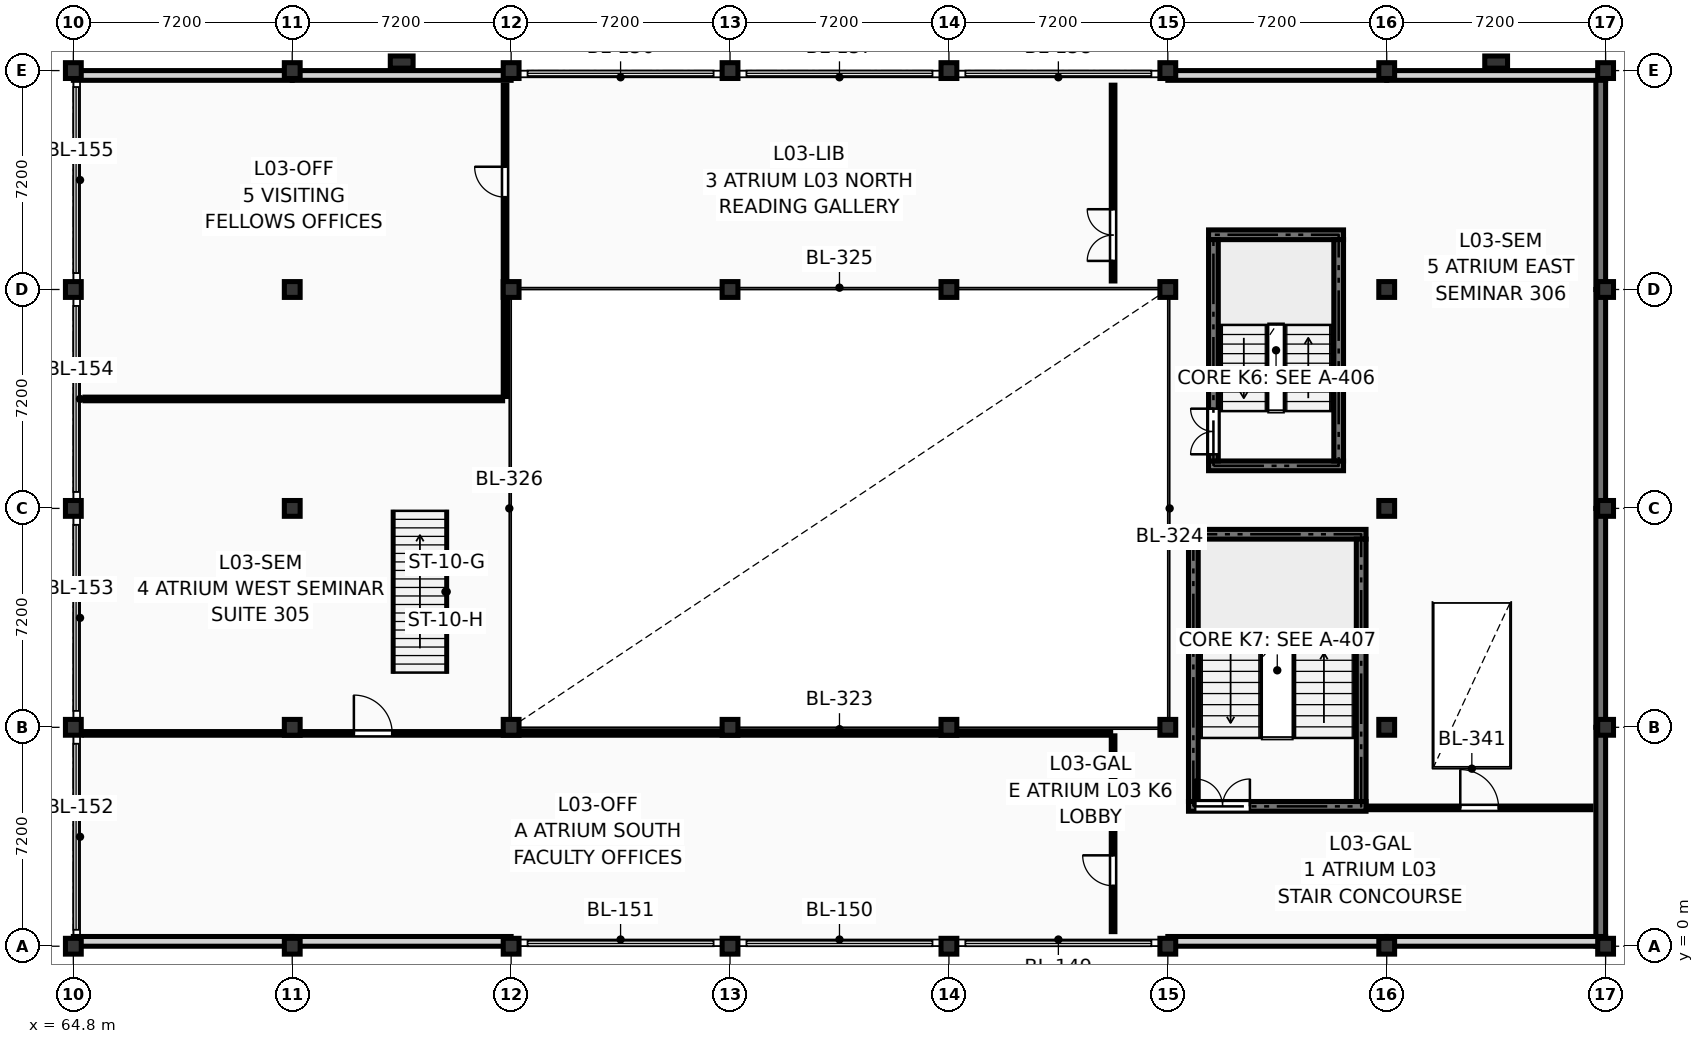
"""IFC4 building model, lengths in metres.
Left out: names, types, materials, properties, quantities, classifications, styles, units other than length and angle.
Written with IfcOpenShell. Run it as: python <this file> out.ifc"""

import sys

from ifc_helpers import new_model, si_unit, direction, frame, frame_2d, origin, origin_2d, place, context, subcontext, project, spatial, rectangle, extrude, element, fill, save


model = new_model("IFC4")
c1 = context("Model", 3, precision=1e-05, world=origin(), true_north=direction((0.0, 1.0)))
c2 = subcontext(c1, "Body", "Model", "MODEL_VIEW")
j1 = project(units=[si_unit("LENGTHUNIT", "METRE"), si_unit("PLANEANGLEUNIT", "RADIAN")], contexts=[c1])
p1 = place(None, origin())
s1 = spatial("IfcSite", under=j1, at=p1, CompositionType="ELEMENT")
p2 = place(p1, origin())
s2 = spatial("IfcBuilding", under=s1, at=p2, CompositionType="ELEMENT")
p3 = place(p2, frame((0.0, 0.0, 12.15)))
s3 = spatial("IfcBuildingStorey", under=s2, at=p3, CompositionType="ELEMENT", Elevation=12.15)
for number, where, z_axis, x_axis in (
    (1, (64.8, 0.0, 0.0), (0.0, 0.0, 1.0), (1.0, 0.0, 0.0)),
    (2, (64.8, 7.2, 0.0), (0.0, 0.0, 1.0), (1.0, 0.0, 0.0)),
    (3, (64.8, 14.4, 0.0), (0.0, 0.0, 1.0), (1.0, 0.0, 0.0)),
    (4, (64.8, 21.6, 0.0), (0.0, 0.0, 1.0), (1.0, 0.0, 0.0)),
    (5, (64.8, 28.8, 0.0), (0.0, 0.0, 1.0), (1.0, 0.0, 0.0)),
    (6, (72.0, 0.0, 0.0), (0.0, 0.0, 1.0), (1.0, 0.0, 0.0)),
    (7, (72.0, 7.2, 0.0), (0.0, 0.0, 1.0), (1.0, 0.0, 0.0)),
    (8, (72.0, 14.4, 0.0), (0.0, 0.0, 1.0), (1.0, 0.0, 0.0)),
    (9, (72.0, 21.6, 0.0), (0.0, 0.0, 1.0), (1.0, 0.0, 0.0)),
    (10, (72.0, 28.8, 0.0), (0.0, 0.0, 1.0), (1.0, 0.0, 0.0)),
    (11, (79.2, 0.0, 0.0), (0.0, 0.0, 1.0), (1.0, 0.0, 0.0)),
    (12, (79.2, 7.2, 0.0), (0.0, 0.0, 1.0), (1.0, 0.0, 0.0)),
    (13, (79.2, 21.6, 0.0), (0.0, 0.0, 1.0), (1.0, 0.0, 0.0)),
    (14, (79.2, 28.8, 0.0), (0.0, 0.0, 1.0), (1.0, 0.0, 0.0)),
    (15, (86.4, 0.0, 0.0), (0.0, 0.0, 1.0), (1.0, 0.0, 0.0)),
    (16, (86.4, 7.2, 0.0), (0.0, 0.0, 1.0), (1.0, 0.0, 0.0)),
    (17, (86.4, 21.6, 0.0), (0.0, 0.0, 1.0), (1.0, 0.0, 0.0)),
    (18, (86.4, 28.8, 0.0), (0.0, 0.0, 1.0), (1.0, 0.0, 0.0)),
    (19, (93.6, 0.0, 0.0), (0.0, 0.0, 1.0), (1.0, 0.0, 0.0)),
    (20, (93.6, 7.2, 0.0), (0.0, 0.0, 1.0), (1.0, 0.0, 0.0)),
    (21, (93.6, 21.6, 0.0), (0.0, 0.0, 1.0), (1.0, 0.0, 0.0)),
    (22, (93.6, 28.8, 0.0), (0.0, 0.0, 1.0), (1.0, 0.0, 0.0)),
    (23, (100.8, 0.0, 0.0), (0.0, 0.0, 1.0), (1.0, 0.0, 0.0)),
    (24, (100.8, 7.2, 0.0), (0.0, 0.0, 1.0), (1.0, 0.0, 0.0)),
    (25, (100.8, 21.6, 0.0), (0.0, 0.0, 1.0), (1.0, 0.0, 0.0)),
    (26, (100.8, 28.8, 0.0), (0.0, 0.0, 1.0), (1.0, 0.0, 0.0)),
    (27, (108.0, 0.0, 0.0), (0.0, 0.0, 1.0), (1.0, 0.0, 0.0)),
    (28, (108.0, 7.2, 0.0), (0.0, 0.0, 1.0), (1.0, 0.0, 0.0)),
    (29, (108.0, 14.4, 0.0), (0.0, 0.0, 1.0), (1.0, 0.0, 0.0)),
    (30, (108.0, 21.6, 0.0), (0.0, 0.0, 1.0), (1.0, 0.0, 0.0)),
    (31, (108.0, 28.8, 0.0), (0.0, 0.0, 1.0), (1.0, 0.0, 0.0)),
    (32, (115.2, 0.0, 0.0), (0.0, 0.0, 1.0), (1.0, 0.0, 0.0)),
    (33, (115.2, 7.2, 0.0), (0.0, 0.0, 1.0), (1.0, 0.0, 0.0)),
    (34, (115.2, 14.4, 0.0), (0.0, 0.0, 1.0), (1.0, 0.0, 0.0)),
    (35, (115.2, 21.6, 0.0), (0.0, 0.0, 1.0), (1.0, 0.0, 0.0)),
    (36, (115.2, 28.8, 0.0), (0.0, 0.0, 1.0), (1.0, 0.0, 0.0)),
):
    element("IfcColumn", number, at=place(p3, frame(where, z_axis=z_axis, x_axis=x_axis)), inside=s3, PredefinedType="COLUMN", context=c2, shape_type="SweptSolid", body=[
        extrude(rectangle(XDim=0.52, YDim=0.52, at=origin_2d()), origin(), (0.0, 0.0, 1.0), 3.6),
    ])
for number, where, z_axis, x_axis in (
    (37, (75.6, 29.08, 0.0), (0.0, 0.0, 1.0), (0.0, 1.0, 0.0)),
    (38, (111.6, 29.08, 0.0), (0.0, 0.0, 1.0), (0.0, 1.0, 0.0)),
):
    element("IfcColumn", number, at=place(p3, frame(where, z_axis=z_axis, x_axis=x_axis)), inside=s3, PredefinedType="PILASTER", context=c2, shape_type="SweptSolid", body=[
        extrude(rectangle(XDim=0.4, YDim=0.75, at=origin_2d()), origin(), (0.0, 0.0, 1.0), 3.6),
    ])
p4 = place(p3, frame((115.04, 21.6, 0.0), z_axis=(0.0, 0.0, 1.0), x_axis=(0.0, 1.0, 0.0)))
e39 = element("IfcWall", 39, at=p4, inside=s3, PredefinedType="SHEAR", context=c2, shape_type="SweptSolid", body=[
    extrude(rectangle(XDim=7.2, YDim=0.32, at=frame_2d((3.6, 0.0))), origin(), (0.0, 0.0, 1.0), 2.84),
])
p5 = place(p3, frame((115.04, 14.4, 0.0), z_axis=(0.0, 0.0, 1.0), x_axis=(0.0, 1.0, 0.0)))
e40 = element("IfcWall", 40, at=p5, inside=s3, PredefinedType="SHEAR", context=c2, shape_type="SweptSolid", body=[
    extrude(rectangle(XDim=7.2, YDim=0.32, at=frame_2d((3.6, 0.0))), origin(), (0.0, 0.0, 1.0), 2.84),
])
for number, where, z_axis, x_axis in (
    (41, (115.04, 7.2, 0.0), (0.0, 0.0, 1.0), (0.0, 1.0, 0.0)),
    (42, (115.04, 0.0, 0.0), (0.0, 0.0, 1.0), (0.0, 1.0, 0.0)),
):
    element("IfcWall", number, at=place(p3, frame(where, z_axis=z_axis, x_axis=x_axis)), inside=s3, PredefinedType="SHEAR", context=c2, shape_type="SweptSolid", body=[
        extrude(rectangle(XDim=7.2, YDim=0.32, at=frame_2d((3.6, 0.0))), origin(), (0.0, 0.0, 1.0), 2.84),
    ])
for number, where, z_axis, x_axis in (
    (43, (108.0, 0.16, 0.0), (0.0, 0.0, 1.0), (1.0, 0.0, 0.0)),
    (44, (100.8, 0.16, 0.0), (0.0, 0.0, 1.0), (1.0, 0.0, 0.0)),
    (45, (72.0, 0.16, 0.0), (0.0, 0.0, 1.0), (1.0, 0.0, 0.0)),
    (46, (64.8, 0.16, 0.0), (0.0, 0.0, 1.0), (1.0, 0.0, 0.0)),
    (47, (64.8, 28.64, 0.0), (0.0, 0.0, 1.0), (1.0, 0.0, 0.0)),
    (48, (72.0, 28.64, 0.0), (0.0, 0.0, 1.0), (1.0, 0.0, 0.0)),
    (49, (100.8, 28.64, 0.0), (0.0, 0.0, 1.0), (1.0, 0.0, 0.0)),
    (50, (108.0, 28.64, 0.0), (0.0, 0.0, 1.0), (1.0, 0.0, 0.0)),
):
    element("IfcWall", number, at=place(p3, frame(where, z_axis=z_axis, x_axis=x_axis)), inside=s3, PredefinedType="SOLIDWALL", context=c2, shape_type="SweptSolid", body=[
        extrude(rectangle(XDim=7.2, YDim=0.32, at=frame_2d((3.6, 0.0))), origin(), (0.0, 0.0, 1.0), 2.84),
    ])
for number, where, z_axis, x_axis in (
    (51, (102.14, 15.8, 0.0), (0.0, 0.0, 1.0), (1.0, 0.0, 0.0)),
    (52, (102.14, 23.4, 0.0), (0.0, 0.0, 1.0), (1.0, 0.0, 0.0)),
):
    element("IfcWall", number, at=place(p3, frame(where, z_axis=z_axis, x_axis=x_axis)), inside=s3, PredefinedType="SHEAR", context=c2, shape_type="SweptSolid", body=[
        extrude(rectangle(XDim=4.44, YDim=0.32, at=frame_2d((2.22, 0.0))), origin(), (0.0, 0.0, 1.0), 3.39),
    ])
p6 = place(p3, frame((102.3, 15.96, 0.0), z_axis=(0.0, 0.0, 1.0), x_axis=(0.0, 1.0, 0.0)))
e53 = element("IfcWall", 53, at=p6, inside=s3, PredefinedType="SHEAR", context=c2, shape_type="SweptSolid", body=[
    extrude(rectangle(XDim=7.28, YDim=0.32, at=frame_2d((3.64, 0.0))), origin(), (0.0, 0.0, 1.0), 3.39),
])
p7 = place(p6, frame((0.22, 0.0, 0.0)))
e54 = element("IfcOpeningElement", 54, at=p7, cuts=e53, PredefinedType="OPENING", context=c2, shape_type="SweptSolid", body=[
    extrude(rectangle(XDim=1.5, YDim=2.2, at=frame_2d((0.75, 1.1))), frame((0.0, 0.172, 0.0), z_axis=(0.0, -1.0, 0.0), x_axis=(1.0, 0.0, 0.0)), (0.0, 0.0, 1.0), 0.344),
])
p8 = place(p3, frame((106.42, 15.96, 0.0), z_axis=(0.0, 0.0, 1.0), x_axis=(0.0, 1.0, 0.0)))
e55 = element("IfcWall", 55, at=p8, inside=s3, PredefinedType="SHEAR", context=c2, shape_type="SweptSolid", body=[
    extrude(rectangle(XDim=7.28, YDim=0.32, at=frame_2d((3.64, 0.0))), origin(), (0.0, 0.0, 1.0), 3.39),
])
p9 = place(p3, frame((101.48, 4.6, 0.0), z_axis=(0.0, 0.0, 1.0), x_axis=(1.0, 0.0, 0.0)))
e56 = element("IfcWall", 56, at=p9, inside=s3, PredefinedType="SHEAR", context=c2, shape_type="SweptSolid", body=[
    extrude(rectangle(XDim=5.84, YDim=0.32, at=frame_2d((2.92, 0.0))), origin(), (0.0, 0.0, 1.0), 3.39),
])
p10 = place(p9, frame((0.22, 0.0, 0.0)))
e57 = element("IfcOpeningElement", 57, at=p10, cuts=e56, PredefinedType="OPENING", context=c2, shape_type="SweptSolid", body=[
    extrude(rectangle(XDim=1.8, YDim=2.2, at=frame_2d((0.9, 1.1))), frame((0.0, 0.172, 0.0), z_axis=(0.0, -1.0, 0.0), x_axis=(1.0, 0.0, 0.0)), (0.0, 0.0, 1.0), 0.344),
])
p11 = place(p3, frame((101.48, 13.55, 0.0), z_axis=(0.0, 0.0, 1.0), x_axis=(1.0, 0.0, 0.0)))
e58 = element("IfcWall", 58, at=p11, inside=s3, PredefinedType="SHEAR", context=c2, shape_type="SweptSolid", body=[
    extrude(rectangle(XDim=5.84, YDim=0.32, at=frame_2d((2.92, 0.0))), origin(), (0.0, 0.0, 1.0), 3.39),
])
for number, where, z_axis, x_axis in (
    (59, (101.64, 4.76, 0.0), (0.0, 0.0, 1.0), (0.0, 1.0, 0.0)),
    (60, (107.16, 4.76, 0.0), (0.0, 0.0, 1.0), (0.0, 1.0, 0.0)),
):
    element("IfcWall", number, at=place(p3, frame(where, z_axis=z_axis, x_axis=x_axis)), inside=s3, PredefinedType="SHEAR", context=c2, shape_type="SweptSolid", body=[
        extrude(rectangle(XDim=8.63, YDim=0.32, at=frame_2d((4.315, 0.0))), origin(), (0.0, 0.0, 1.0), 3.39),
    ])
p12 = place(p3, frame((99.0, 0.48, 0.0), z_axis=(0.0, 0.0, 1.0), x_axis=(0.0, 1.0, 0.0)))
e61 = element("IfcWall", 61, at=p12, inside=s3, PredefinedType="PARTITIONING", context=c2, shape_type="SweptSolid", body=[
    extrude(rectangle(XDim=6.44, YDim=0.12, at=frame_2d((3.22, 0.0))), origin(), (0.0, 0.0, 1.0), 3.375),
])
p13 = place(p12, frame((1.509, 0.0, 0.0)))
e62 = element("IfcOpeningElement", 62, at=p13, cuts=e61, PredefinedType="OPENING", context=c2, shape_type="SweptSolid", body=[
    extrude(rectangle(XDim=1.0, YDim=2.15, at=frame_2d((0.5, 1.075))), frame((0.0, 0.072, 0.0), z_axis=(0.0, -1.0, 0.0), x_axis=(1.0, 0.0, 0.0)), (0.0, 0.0, 1.0), 0.144),
])
p14 = place(p3, frame((65.18, 7.0, 0.0), z_axis=(0.0, 0.0, 1.0), x_axis=(1.0, 0.0, 0.0)))
e63 = element("IfcWall", 63, at=p14, inside=s3, PredefinedType="PARTITIONING", context=c2, shape_type="SweptSolid", body=[
    extrude(rectangle(XDim=33.74, YDim=0.12, at=frame_2d((16.87, 0.0))), origin(), (0.0, 0.0, 1.0), 2.595),
])
p15 = place(p14, frame((8.847, 0.0, 0.0)))
e64 = element("IfcOpeningElement", 64, at=p15, cuts=e63, PredefinedType="OPENING", context=c2, shape_type="SweptSolid", body=[
    extrude(rectangle(XDim=1.26, YDim=2.18, at=frame_2d((0.63, 1.09))), frame((0.0, 0.072, 0.0), z_axis=(0.0, -1.0, 0.0), x_axis=(1.0, 0.0, 0.0)), (0.0, 0.0, 1.0), 0.144),
])
p16 = place(p3, frame((65.18, 18.0, 0.0), z_axis=(0.0, 0.0, 1.0), x_axis=(1.0, 0.0, 0.0)))
e65 = element("IfcWall", 65, at=p16, inside=s3, PredefinedType="PARTITIONING", context=c2, shape_type="SweptSolid", body=[
    extrude(rectangle(XDim=13.74, YDim=0.12, at=frame_2d((6.87, 0.0))), origin(), (0.0, 0.0, 1.0), 2.955),
])
p17 = place(p3, frame((79.0, 18.08, 0.0), z_axis=(0.0, 0.0, 1.0), x_axis=(0.0, 1.0, 0.0)))
e66 = element("IfcWall", 66, at=p17, inside=s3, PredefinedType="PARTITIONING", context=c2, shape_type="SweptSolid", body=[
    extrude(rectangle(XDim=10.24, YDim=0.12, at=frame_2d((5.12, 0.0))), origin(), (0.0, 0.0, 1.0), 3.375),
])
p18 = place(p17, frame((6.557, 0.0, 0.0)))
e67 = element("IfcOpeningElement", 67, at=p18, cuts=e66, PredefinedType="OPENING", context=c2, shape_type="SweptSolid", body=[
    extrude(rectangle(XDim=1.0, YDim=2.15, at=frame_2d((0.5, 1.075))), frame((0.0, 0.072, 0.0), z_axis=(0.0, -1.0, 0.0), x_axis=(1.0, 0.0, 0.0)), (0.0, 0.0, 1.0), 0.144),
])
p19 = place(p3, frame((99.0, 21.88, 0.0), z_axis=(0.0, 0.0, 1.0), x_axis=(0.0, 1.0, 0.0)))
e68 = element("IfcWall", 68, at=p19, inside=s3, PredefinedType="PARTITIONING", context=c2, shape_type="SweptSolid", body=[
    extrude(rectangle(XDim=6.44, YDim=0.12, at=frame_2d((3.22, 0.0))), origin(), (0.0, 0.0, 1.0), 3.375),
])
p20 = place(p19, frame((0.66, 0.0, 0.0)))
e69 = element("IfcOpeningElement", 69, at=p20, cuts=e68, PredefinedType="OPENING", context=c2, shape_type="SweptSolid", body=[
    extrude(rectangle(XDim=1.7, YDim=2.28, at=frame_2d((0.85, 1.14))), frame((0.0, 0.072, 0.0), z_axis=(0.0, -1.0, 0.0), x_axis=(1.0, 0.0, 0.0)), (0.0, 0.0, 1.0), 0.144),
])
p21 = place(p3, frame((107.38, 4.55, 0.0), z_axis=(0.0, 0.0, 1.0), x_axis=(1.0, 0.0, 0.0)))
e70 = element("IfcWall", 70, at=p21, inside=s3, PredefinedType="PARTITIONING", context=c2, shape_type="SweptSolid", body=[
    extrude(rectangle(XDim=7.34, YDim=0.12, at=frame_2d((3.67, 0.0))), origin(), (0.0, 0.0, 1.0), 3.375),
])
p22 = place(p21, frame((3.04, 0.0, 0.0)))
e71 = element("IfcOpeningElement", 71, at=p22, cuts=e70, PredefinedType="OPENING", context=c2, shape_type="SweptSolid", body=[
    extrude(rectangle(XDim=1.26, YDim=2.18, at=frame_2d((0.63, 1.09))), frame((0.0, 0.072, 0.0), z_axis=(0.0, -1.0, 0.0), x_axis=(1.0, 0.0, 0.0)), (0.0, 0.0, 1.0), 0.144),
])
p23 = place(p7, origin())
e72 = element("IfcDoor", 72, at=p23, inside=s3, OperationType="DOUBLE_DOOR_SINGLE_SWING", PredefinedType="DOOR", context=c2, shape_type="SweptSolid", body=[
    extrude(rectangle(XDim=1.5, YDim=2.2, at=frame_2d((0.75, 1.1))), frame((0.0, 0.025, 0.0), z_axis=(0.0, -1.0, 0.0), x_axis=(1.0, 0.0, 0.0)), (0.0, 0.0, 1.0), 0.05),
])
fill(e54, e72)
p24 = place(p10, origin())
e73 = element("IfcDoor", 73, at=p24, inside=s3, OperationType="DOUBLE_DOOR_SINGLE_SWING", PredefinedType="DOOR", context=c2, shape_type="SweptSolid", body=[
    extrude(rectangle(XDim=1.8, YDim=2.2, at=frame_2d((0.9, 1.1))), frame((0.0, 0.025, 0.0), z_axis=(0.0, -1.0, 0.0), x_axis=(1.0, 0.0, 0.0)), (0.0, 0.0, 1.0), 0.05),
])
fill(e57, e73)
p25 = place(p13, origin())
e74 = element("IfcDoor", 74, at=p25, inside=s3, OperationType="SINGLE_SWING_RIGHT", PredefinedType="DOOR", context=c2, shape_type="SweptSolid", body=[
    extrude(rectangle(XDim=1.0, YDim=2.15, at=frame_2d((0.5, 1.075))), frame((0.0, 0.025, 0.0), z_axis=(0.0, -1.0, 0.0), x_axis=(1.0, 0.0, 0.0)), (0.0, 0.0, 1.0), 0.05),
])
fill(e62, e74)
p26 = place(p15, origin())
e75 = element("IfcDoor", 75, at=p26, inside=s3, OperationType="SINGLE_SWING_LEFT", PredefinedType="DOOR", context=c2, shape_type="SweptSolid", body=[
    extrude(rectangle(XDim=1.26, YDim=2.18, at=frame_2d((0.63, 1.09))), frame((0.0, 0.025, 0.0), z_axis=(0.0, -1.0, 0.0), x_axis=(1.0, 0.0, 0.0)), (0.0, 0.0, 1.0), 0.05),
])
fill(e64, e75)
p27 = place(p18, origin())
e76 = element("IfcDoor", 76, at=p27, inside=s3, OperationType="SINGLE_SWING_RIGHT", PredefinedType="DOOR", context=c2, shape_type="SweptSolid", body=[
    extrude(rectangle(XDim=1.0, YDim=2.15, at=frame_2d((0.5, 1.075))), frame((0.0, 0.025, 0.0), z_axis=(0.0, -1.0, 0.0), x_axis=(1.0, 0.0, 0.0)), (0.0, 0.0, 1.0), 0.05),
])
fill(e67, e76)
p28 = place(p20, origin())
e77 = element("IfcDoor", 77, at=p28, inside=s3, OperationType="DOUBLE_DOOR_SINGLE_SWING", PredefinedType="DOOR", context=c2, shape_type="SweptSolid", body=[
    extrude(rectangle(XDim=1.7, YDim=2.28, at=frame_2d((0.85, 1.14))), frame((0.0, 0.025, 0.0), z_axis=(0.0, -1.0, 0.0), x_axis=(1.0, 0.0, 0.0)), (0.0, 0.0, 1.0), 0.05),
])
fill(e69, e77)
p29 = place(p22, origin())
e78 = element("IfcDoor", 78, at=p29, inside=s3, OperationType="SINGLE_SWING_LEFT", PredefinedType="DOOR", context=c2, shape_type="SweptSolid", body=[
    extrude(rectangle(XDim=1.26, YDim=2.18, at=frame_2d((0.63, 1.09))), frame((0.0, 0.025, 0.0), z_axis=(0.0, -1.0, 0.0), x_axis=(1.0, 0.0, 0.0)), (0.0, 0.0, 1.0), 0.05),
])
fill(e71, e78)
save(model, sys.argv[1])
